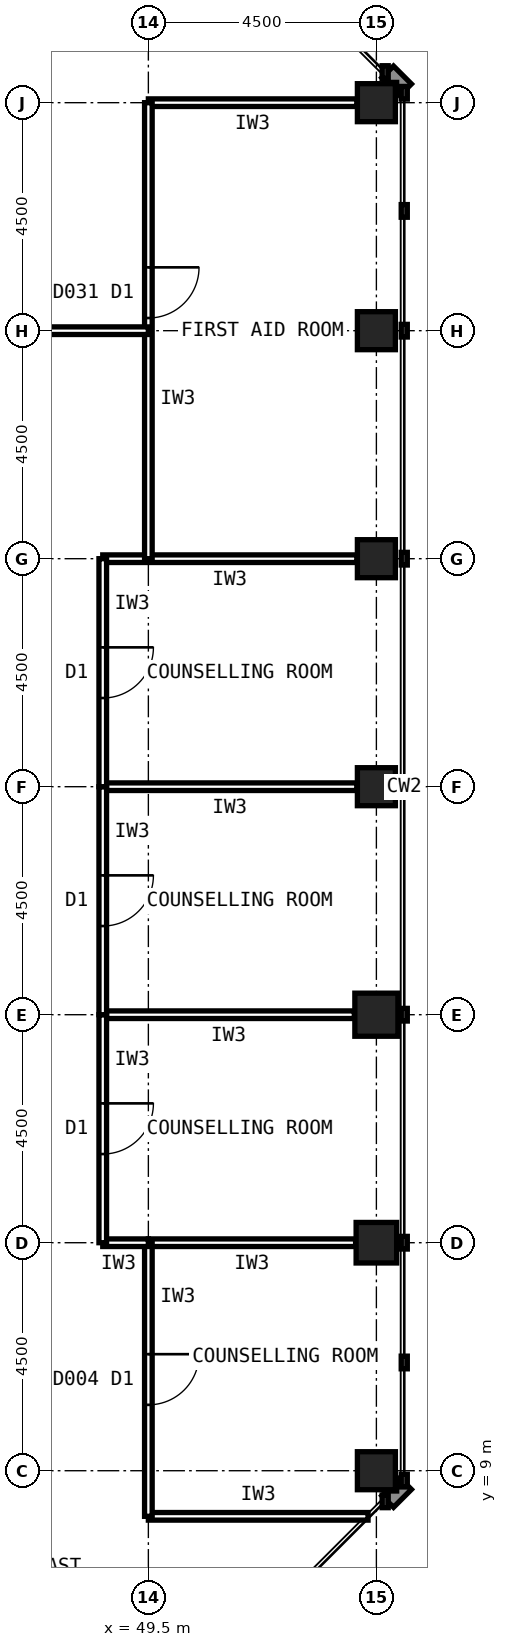
"""IFC4 building model, lengths in metres.
Left out: names, types, materials, properties, quantities, classifications, styles, units other than length and angle.
Written with IfcOpenShell. Run it as: python <this file> out.ifc"""

import sys

from ifc_helpers import new_model, si_unit, direction, frame, frame_2d, origin, origin_2d, place, context, subcontext, project, spatial, rectangle, hollow_rectangle, extrude, element, fill, save


model = new_model("IFC4")
c1 = context("Model", 3, precision=1e-05, world=origin(), true_north=direction((0.0, 1.0)))
c2 = subcontext(c1, "Body", "Model", "MODEL_VIEW")
j1 = project(units=[si_unit("LENGTHUNIT", "METRE"), si_unit("PLANEANGLEUNIT", "RADIAN")], contexts=[c1])
p1 = place(None, origin())
s1 = spatial("IfcSite", under=j1, at=p1, CompositionType="ELEMENT")
p2 = place(p1, origin())
s2 = spatial("IfcBuilding", under=s1, at=p2, CompositionType="ELEMENT")
p3 = place(p2, frame((0.0, 0.0, 191.6)))
s3 = spatial("IfcBuildingStorey", under=s2, at=p3, CompositionType="ELEMENT", Elevation=191.6)
p4 = place(p3, frame((54.0, 9.0, 0.0), z_axis=(0.0, 0.0, 1.0), x_axis=(1.0, 0.0, 0.0)))
e1 = element("IfcColumn", 1, at=p4, inside=s3, PredefinedType="COLUMN", context=c2, shape_type="SweptSolid", body=[
    extrude(hollow_rectangle(XDim=0.75, YDim=0.75, WallThickness=0.04, at=origin_2d()), origin(), (0.0, 0.0, 1.0), 4.0),
])
p5 = place(p3, frame((54.0, 13.5, 0.0), z_axis=(0.0, 0.0, 1.0), x_axis=(1.0, 0.0, 0.0)))
e2 = element("IfcColumn", 2, at=p5, inside=s3, PredefinedType="COLUMN", context=c2, shape_type="SweptSolid", body=[
    extrude(hollow_rectangle(XDim=0.8, YDim=0.8, WallThickness=0.045, at=origin_2d()), origin(), (0.0, 0.0, 1.0), 4.0),
])
p6 = place(p3, frame((54.0, 18.0, 0.0), z_axis=(0.0, 0.0, 1.0), x_axis=(1.0, 0.0, 0.0)))
e3 = element("IfcColumn", 3, at=p6, inside=s3, PredefinedType="COLUMN", context=c2, shape_type="SweptSolid", body=[
    extrude(hollow_rectangle(XDim=0.85, YDim=0.85, WallThickness=0.05, at=origin_2d()), origin(), (0.0, 0.0, 1.0), 4.0),
])
for number, where, z_axis, x_axis in (
    (4, (54.0, 22.5, 0.0), (0.0, 0.0, 1.0), (1.0, 0.0, 0.0)),
    (5, (54.0, 27.0, 0.0), (0.0, 0.0, 1.0), (1.0, 0.0, 0.0)),
    (6, (54.0, 31.5, 0.0), (0.0, 0.0, 1.0), (1.0, 0.0, 0.0)),
    (7, (54.0, 36.0, 0.0), (0.0, 0.0, 1.0), (1.0, 0.0, 0.0)),
):
    element("IfcColumn", number, at=place(p3, frame(where, z_axis=z_axis, x_axis=x_axis)), inside=s3, PredefinedType="COLUMN", context=c2, shape_type="SweptSolid", body=[
        extrude(hollow_rectangle(XDim=0.75, YDim=0.75, WallThickness=0.04, at=origin_2d()), origin(), (0.0, 0.0, 1.0), 4.0),
    ])
p7 = place(p3, frame((49.5, 8.1, 0.0), z_axis=(0.0, 0.0, 1.0), x_axis=(1.0, 0.0, 0.0)))
e8 = element("IfcWall", 8, at=p7, inside=s3, PredefinedType="PARTITIONING", context=c2, shape_type="SweptSolid", body=[
    extrude(rectangle(XDim=4.335, YDim=0.15, at=frame_2d((2.168, 0.0))), origin(), (0.0, 0.0, 1.0), 3.84),
])
p8 = place(p3, frame((53.59, 13.5, 0.0), z_axis=(0.0, 0.0, 1.0), x_axis=(-1.0, 0.0, 0.0)))
e9 = element("IfcWall", 9, at=p8, inside=s3, PredefinedType="PARTITIONING", context=c2, shape_type="SweptSolid", body=[
    extrude(rectangle(XDim=4.09, YDim=0.15, at=frame_2d((2.045, 0.0))), origin(), (0.0, 0.0, 1.0), 2.989),
])
p9 = place(p3, frame((49.5, 13.5, 0.0), z_axis=(0.0, 0.0, 1.0), x_axis=(0.0, -1.0, 0.0)))
e10 = element("IfcWall", 10, at=p9, inside=s3, PredefinedType="PARTITIONING", context=c2, shape_type="SweptSolid", body=[
    extrude(rectangle(XDim=5.4, YDim=0.15, at=frame_2d((2.7, 0.0))), origin(), (0.0, 0.0, 1.0), 3.84),
])
p10 = place(p9, frame((2.2, 0.0, 0.0)))
e11 = element("IfcOpeningElement", 11, at=p10, cuts=e10, PredefinedType="OPENING", context=c2, shape_type="SweptSolid", body=[
    extrude(rectangle(XDim=1.0, YDim=2.1, at=frame_2d((0.5, 1.05))), frame((0.0, 0.085, 0.0), z_axis=(0.0, -1.0, 0.0), x_axis=(1.0, 0.0, 0.0)), (0.0, 0.0, 1.0), 0.17),
])
p11 = place(p3, frame((48.6, 13.5, 0.0), z_axis=(0.0, 0.0, 1.0), x_axis=(1.0, 0.0, 0.0)))
e12 = element("IfcWall", 12, at=p11, inside=s3, PredefinedType="PARTITIONING", context=c2, shape_type="SweptSolid", body=[
    extrude(rectangle(XDim=0.9, YDim=0.15, at=frame_2d((0.45, 0.0))), origin(), (0.0, 0.0, 1.0), 2.989),
])
p12 = place(p3, frame((53.565, 18.0, 0.0), z_axis=(0.0, 0.0, 1.0), x_axis=(-1.0, 0.0, 0.0)))
e13 = element("IfcWall", 13, at=p12, inside=s3, PredefinedType="PARTITIONING", context=c2, shape_type="SweptSolid", body=[
    extrude(rectangle(XDim=4.965, YDim=0.15, at=frame_2d((2.482, 0.0))), origin(), (0.0, 0.0, 1.0), 2.989),
])
p13 = place(p3, frame((48.6, 18.0, 0.0), z_axis=(0.0, 0.0, 1.0), x_axis=(0.0, -1.0, 0.0)))
e14 = element("IfcWall", 14, at=p13, inside=s3, PredefinedType="PARTITIONING", context=c2, shape_type="SweptSolid", body=[
    extrude(rectangle(XDim=4.5, YDim=0.15, at=frame_2d((2.25, 0.0))), origin(), (0.0, 0.0, 1.0), 3.84),
])
p14 = place(p13, frame((1.75, 0.0, 0.0)))
e15 = element("IfcOpeningElement", 15, at=p14, cuts=e14, PredefinedType="OPENING", context=c2, shape_type="SweptSolid", body=[
    extrude(rectangle(XDim=1.0, YDim=2.1, at=frame_2d((0.5, 1.05))), frame((0.0, 0.085, 0.0), z_axis=(0.0, -1.0, 0.0), x_axis=(1.0, 0.0, 0.0)), (0.0, 0.0, 1.0), 0.17),
])
p15 = place(p3, frame((53.615, 22.5, 0.0), z_axis=(0.0, 0.0, 1.0), x_axis=(-1.0, 0.0, 0.0)))
e16 = element("IfcWall", 16, at=p15, inside=s3, PredefinedType="PARTITIONING", context=c2, shape_type="SweptSolid", body=[
    extrude(rectangle(XDim=5.015, YDim=0.15, at=frame_2d((2.507, 0.0))), origin(), (0.0, 0.0, 1.0), 2.989),
])
p16 = place(p3, frame((48.6, 22.5, 0.0), z_axis=(0.0, 0.0, 1.0), x_axis=(0.0, -1.0, 0.0)))
e17 = element("IfcWall", 17, at=p16, inside=s3, PredefinedType="PARTITIONING", context=c2, shape_type="SweptSolid", body=[
    extrude(rectangle(XDim=4.5, YDim=0.15, at=frame_2d((2.25, 0.0))), origin(), (0.0, 0.0, 1.0), 3.84),
])
p17 = place(p16, frame((1.75, 0.0, 0.0)))
e18 = element("IfcOpeningElement", 18, at=p17, cuts=e17, PredefinedType="OPENING", context=c2, shape_type="SweptSolid", body=[
    extrude(rectangle(XDim=1.0, YDim=2.1, at=frame_2d((0.5, 1.05))), frame((0.0, 0.085, 0.0), z_axis=(0.0, -1.0, 0.0), x_axis=(1.0, 0.0, 0.0)), (0.0, 0.0, 1.0), 0.17),
])
p18 = place(p3, frame((53.615, 27.0, 0.0), z_axis=(0.0, 0.0, 1.0), x_axis=(-1.0, 0.0, 0.0)))
e19 = element("IfcWall", 19, at=p18, inside=s3, PredefinedType="PARTITIONING", context=c2, shape_type="SweptSolid", body=[
    extrude(rectangle(XDim=5.015, YDim=0.15, at=frame_2d((2.507, 0.0))), origin(), (0.0, 0.0, 1.0), 2.989),
])
p19 = place(p3, frame((48.6, 27.0, 0.0), z_axis=(0.0, 0.0, 1.0), x_axis=(0.0, -1.0, 0.0)))
e20 = element("IfcWall", 20, at=p19, inside=s3, PredefinedType="PARTITIONING", context=c2, shape_type="SweptSolid", body=[
    extrude(rectangle(XDim=4.5, YDim=0.15, at=frame_2d((2.25, 0.0))), origin(), (0.0, 0.0, 1.0), 3.84),
])
p20 = place(p19, frame((1.75, 0.0, 0.0)))
e21 = element("IfcOpeningElement", 21, at=p20, cuts=e20, PredefinedType="OPENING", context=c2, shape_type="SweptSolid", body=[
    extrude(rectangle(XDim=1.0, YDim=2.1, at=frame_2d((0.5, 1.05))), frame((0.0, 0.085, 0.0), z_axis=(0.0, -1.0, 0.0), x_axis=(1.0, 0.0, 0.0)), (0.0, 0.0, 1.0), 0.17),
])
p21 = place(p3, frame((53.615, 36.0, 0.0), z_axis=(0.0, 0.0, 1.0), x_axis=(-1.0, 0.0, 0.0)))
e22 = element("IfcWall", 22, at=p21, inside=s3, PredefinedType="PARTITIONING", context=c2, shape_type="SweptSolid", body=[
    extrude(rectangle(XDim=4.115, YDim=0.15, at=frame_2d((2.058, 0.0))), origin(), (0.0, 0.0, 1.0), 2.989),
])
p22 = place(p3, frame((49.5, 36.0, 0.0), z_axis=(0.0, 0.0, 1.0), x_axis=(0.0, -1.0, 0.0)))
e23 = element("IfcWall", 23, at=p22, inside=s3, PredefinedType="PARTITIONING", context=c2, shape_type="SweptSolid", body=[
    extrude(rectangle(XDim=9.0, YDim=0.15, at=frame_2d((4.5, 0.0))), origin(), (0.0, 0.0, 1.0), 3.84),
])
p23 = place(p22, frame((3.25, 0.0, 0.0)))
e24 = element("IfcOpeningElement", 24, at=p23, cuts=e23, PredefinedType="OPENING", context=c2, shape_type="SweptSolid", body=[
    extrude(rectangle(XDim=1.0, YDim=2.1, at=frame_2d((0.5, 1.05))), frame((0.0, 0.085, 0.0), z_axis=(0.0, -1.0, 0.0), x_axis=(1.0, 0.0, 0.0)), (0.0, 0.0, 1.0), 0.17),
])
p24 = place(p3, frame((42.3, 31.5, 0.0), z_axis=(0.0, 0.0, 1.0), x_axis=(1.0, 0.0, 0.0)))
e25 = element("IfcWall", 25, at=p24, inside=s3, PredefinedType="PARTITIONING", context=c2, shape_type="SweptSolid", body=[
    extrude(rectangle(XDim=7.2, YDim=0.15, at=frame_2d((3.6, 0.0))), origin(), (0.0, 0.0, 1.0), 2.989),
])
p25 = place(p24, frame((3.1, 0.0, 0.0)))
e26 = element("IfcOpeningElement", 26, at=p25, cuts=e25, PredefinedType="OPENING", context=c2, shape_type="SweptSolid", body=[
    extrude(rectangle(XDim=1.0, YDim=2.1, at=frame_2d((0.5, 1.05))), frame((0.0, 0.085, 0.0), z_axis=(0.0, -1.0, 0.0), x_axis=(1.0, 0.0, 0.0)), (0.0, 0.0, 1.0), 0.17),
])
p26 = place(p10, origin())
e27 = element("IfcDoor", 27, at=p26, inside=s3, OperationType="SINGLE_SWING_LEFT", PredefinedType="DOOR", context=c2, shape_type="SweptSolid", body=[
    extrude(rectangle(XDim=1.0, YDim=2.1, at=frame_2d((0.5, 1.05))), frame((0.0, 0.025, 0.0), z_axis=(0.0, -1.0, 0.0), x_axis=(1.0, 0.0, 0.0)), (0.0, 0.0, 1.0), 0.05),
])
fill(e11, e27)
p27 = place(p14, origin())
e28 = element("IfcDoor", 28, at=p27, inside=s3, OperationType="SINGLE_SWING_LEFT", PredefinedType="DOOR", context=c2, shape_type="SweptSolid", body=[
    extrude(rectangle(XDim=1.0, YDim=2.1, at=frame_2d((0.5, 1.05))), frame((0.0, 0.025, 0.0), z_axis=(0.0, -1.0, 0.0), x_axis=(1.0, 0.0, 0.0)), (0.0, 0.0, 1.0), 0.05),
])
fill(e15, e28)
p28 = place(p17, origin())
e29 = element("IfcDoor", 29, at=p28, inside=s3, OperationType="SINGLE_SWING_LEFT", PredefinedType="DOOR", context=c2, shape_type="SweptSolid", body=[
    extrude(rectangle(XDim=1.0, YDim=2.1, at=frame_2d((0.5, 1.05))), frame((0.0, 0.025, 0.0), z_axis=(0.0, -1.0, 0.0), x_axis=(1.0, 0.0, 0.0)), (0.0, 0.0, 1.0), 0.05),
])
fill(e18, e29)
p29 = place(p20, origin())
e30 = element("IfcDoor", 30, at=p29, inside=s3, OperationType="SINGLE_SWING_LEFT", PredefinedType="DOOR", context=c2, shape_type="SweptSolid", body=[
    extrude(rectangle(XDim=1.0, YDim=2.1, at=frame_2d((0.5, 1.05))), frame((0.0, 0.025, 0.0), z_axis=(0.0, -1.0, 0.0), x_axis=(1.0, 0.0, 0.0)), (0.0, 0.0, 1.0), 0.05),
])
fill(e21, e30)
p30 = place(p23, origin())
e31 = element("IfcDoor", 31, at=p30, inside=s3, OperationType="SINGLE_SWING_LEFT", PredefinedType="DOOR", context=c2, shape_type="SweptSolid", body=[
    extrude(rectangle(XDim=1.0, YDim=2.1, at=frame_2d((0.5, 1.05))), frame((0.0, 0.025, 0.0), z_axis=(0.0, -1.0, 0.0), x_axis=(1.0, 0.0, 0.0)), (0.0, 0.0, 1.0), 0.05),
])
fill(e24, e31)
save(model, sys.argv[1])
